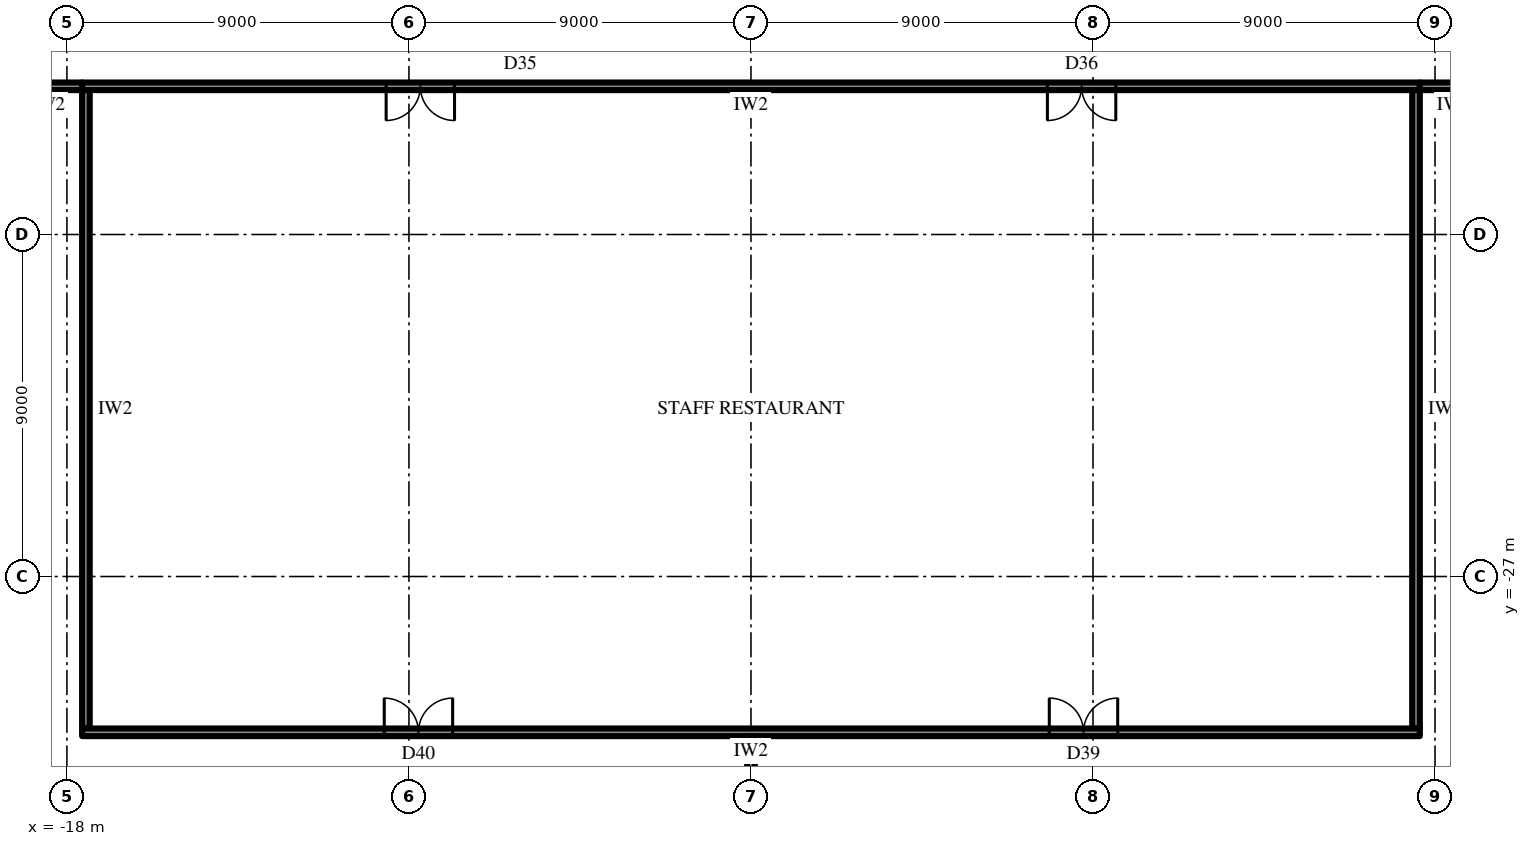
"""IFC4 building model, lengths in metres.
Left out: names, types, materials, properties, quantities, classifications, styles, units other than length and angle.
Written with IfcOpenShell. Run it as: python <this file> out.ifc"""

import sys

from ifc_helpers import new_model, si_unit, direction, frame, frame_2d, origin, place, context, subcontext, project, spatial, rectangle, extrude, element, fill, save


model = new_model("IFC4")
c1 = context("Model", 3, precision=1e-05, world=origin(), true_north=direction((0.0, 1.0)))
c2 = subcontext(c1, "Body", "Model", "MODEL_VIEW")
j1 = project(units=[si_unit("LENGTHUNIT", "METRE"), si_unit("PLANEANGLEUNIT", "RADIAN")], contexts=[c1])
p1 = place(None, origin())
s1 = spatial("IfcSite", under=j1, at=p1, CompositionType="ELEMENT")
p2 = place(p1, origin())
s2 = spatial("IfcBuilding", under=s1, at=p2, CompositionType="ELEMENT")
p3 = place(p2, frame((0.0, 0.0, 7.0)))
s3 = spatial("IfcBuildingStorey", under=s2, at=p3, CompositionType="ELEMENT", Elevation=7.0)
p4 = place(p3, frame((17.6, -14.1, 0.0), z_axis=(0.0, 0.0, 1.0), x_axis=(-1.0, 0.0, 0.0)))
e1 = element("IfcWall", 1, at=p4, inside=s3, PredefinedType="PARTITIONING", context=c2, shape_type="SweptSolid", body=[
    extrude(rectangle(XDim=35.2, YDim=0.2, at=frame_2d((17.6, 0.0))), origin(), (0.0, 0.0, 1.0), 5.65),
])
p5 = place(p4, frame((25.4, 0.0, 0.0)))
e2 = element("IfcOpeningElement", 2, at=p5, cuts=e1, PredefinedType="OPENING", context=c2, shape_type="SweptSolid", body=[
    extrude(rectangle(XDim=1.8, YDim=2.4, at=frame_2d((0.9, 1.2))), frame((0.0, 0.11, 0.0), z_axis=(0.0, -1.0, 0.0), x_axis=(1.0, 0.0, 0.0)), (0.0, 0.0, 1.0), 0.22),
])
p6 = place(p4, frame((8.0, 0.0, 0.0)))
e3 = element("IfcOpeningElement", 3, at=p6, cuts=e1, PredefinedType="OPENING", context=c2, shape_type="SweptSolid", body=[
    extrude(rectangle(XDim=1.8, YDim=2.4, at=frame_2d((0.9, 1.2))), frame((0.0, 0.11, 0.0), z_axis=(0.0, -1.0, 0.0), x_axis=(1.0, 0.0, 0.0)), (0.0, 0.0, 1.0), 0.22),
])
for number, where, z_axis, x_axis in (
    (4, (17.5, -14.2, 0.0), (0.0, 0.0, 1.0), (0.0, -1.0, 0.0)),
    (5, (-17.5, -14.2, 0.0), (0.0, 0.0, 1.0), (0.0, -1.0, 0.0)),
):
    element("IfcWall", number, at=place(p3, frame(where, z_axis=z_axis, x_axis=x_axis)), inside=s3, PredefinedType="PARTITIONING", context=c2, shape_type="SweptSolid", body=[
        extrude(rectangle(XDim=16.8, YDim=0.2, at=frame_2d((8.4, 0.0))), origin(), (0.0, 0.0, 1.0), 5.65),
    ])
p7 = place(p3, frame((17.6, -31.1, 0.0), z_axis=(0.0, 0.0, 1.0), x_axis=(-1.0, 0.0, 0.0)))
e6 = element("IfcWall", 6, at=p7, inside=s3, PredefinedType="PARTITIONING", context=c2, shape_type="SweptSolid", body=[
    extrude(rectangle(XDim=35.2, YDim=0.2, at=frame_2d((17.6, 0.0))), origin(), (0.0, 0.0, 1.0), 5.65),
])
p8 = place(p7, frame((7.95, 0.0, 0.0)))
e7 = element("IfcOpeningElement", 7, at=p8, cuts=e6, PredefinedType="OPENING", context=c2, shape_type="SweptSolid", body=[
    extrude(rectangle(XDim=1.8, YDim=2.4, at=frame_2d((0.9, 1.2))), frame((0.0, 0.11, 0.0), z_axis=(0.0, -1.0, 0.0), x_axis=(1.0, 0.0, 0.0)), (0.0, 0.0, 1.0), 0.22),
])
p9 = place(p7, frame((25.45, 0.0, 0.0)))
e8 = element("IfcOpeningElement", 8, at=p9, cuts=e6, PredefinedType="OPENING", context=c2, shape_type="SweptSolid", body=[
    extrude(rectangle(XDim=1.8, YDim=2.4, at=frame_2d((0.9, 1.2))), frame((0.0, 0.11, 0.0), z_axis=(0.0, -1.0, 0.0), x_axis=(1.0, 0.0, 0.0)), (0.0, 0.0, 1.0), 0.22),
])
for number, where, z_axis, x_axis in (
    (9, (-17.6, -14.1, 0.0), (0.0, 0.0, 1.0), (-1.0, 0.0, 0.0)),
    (10, (19.4, -14.1, 0.0), (0.0, 0.0, 1.0), (-1.0, 0.0, 0.0)),
):
    element("IfcWall", number, at=place(p3, frame(where, z_axis=z_axis, x_axis=x_axis)), inside=s3, PredefinedType="PARTITIONING", context=c2, shape_type="SweptSolid", body=[
        extrude(rectangle(XDim=1.8, YDim=0.2, at=frame_2d((0.9, 0.0))), origin(), (0.0, 0.0, 1.0), 5.65),
    ])
p10 = place(p3, frame((0.0, -31.2, 0.0), z_axis=(0.0, 0.0, 1.0), x_axis=(0.0, -1.0, 0.0)))
e11 = element("IfcWall", 11, at=p10, inside=s3, PredefinedType="PARTITIONING", context=c2, shape_type="SweptSolid", body=[
    extrude(rectangle(XDim=2.52, YDim=0.2, at=frame_2d((1.26, 0.0))), origin(), (0.0, 0.0, 1.0), 4.594),
])
p11 = place(p8, frame((1.8, 0.0, 0.0), z_axis=(0.0, 0.0, 1.0), x_axis=(-1.0, 0.0, 0.0)))
e12 = element("IfcDoor", 12, at=p11, inside=s3, OperationType="DOUBLE_DOOR_SINGLE_SWING", PredefinedType="DOOR", context=c2, shape_type="SweptSolid", body=[
    extrude(rectangle(XDim=1.8, YDim=2.4, at=frame_2d((0.9, 1.2))), frame((0.0, 0.025, 0.0), z_axis=(0.0, -1.0, 0.0), x_axis=(1.0, 0.0, 0.0)), (0.0, 0.0, 1.0), 0.05),
])
fill(e7, e12)
p12 = place(p9, frame((1.8, 0.0, 0.0), z_axis=(0.0, 0.0, 1.0), x_axis=(-1.0, 0.0, 0.0)))
e13 = element("IfcDoor", 13, at=p12, inside=s3, OperationType="DOUBLE_DOOR_SINGLE_SWING", PredefinedType="DOOR", context=c2, shape_type="SweptSolid", body=[
    extrude(rectangle(XDim=1.8, YDim=2.4, at=frame_2d((0.9, 1.2))), frame((0.0, 0.025, 0.0), z_axis=(0.0, -1.0, 0.0), x_axis=(1.0, 0.0, 0.0)), (0.0, 0.0, 1.0), 0.05),
])
fill(e8, e13)
p13 = place(p5, origin())
e14 = element("IfcDoor", 14, at=p13, inside=s3, OperationType="DOUBLE_DOOR_SINGLE_SWING", PredefinedType="DOOR", context=c2, shape_type="SweptSolid", body=[
    extrude(rectangle(XDim=1.8, YDim=2.4, at=frame_2d((0.9, 1.2))), frame((0.0, 0.025, 0.0), z_axis=(0.0, -1.0, 0.0), x_axis=(1.0, 0.0, 0.0)), (0.0, 0.0, 1.0), 0.05),
])
fill(e2, e14)
p14 = place(p6, origin())
e15 = element("IfcDoor", 15, at=p14, inside=s3, OperationType="DOUBLE_DOOR_SINGLE_SWING", PredefinedType="DOOR", context=c2, shape_type="SweptSolid", body=[
    extrude(rectangle(XDim=1.8, YDim=2.4, at=frame_2d((0.9, 1.2))), frame((0.0, 0.025, 0.0), z_axis=(0.0, -1.0, 0.0), x_axis=(1.0, 0.0, 0.0)), (0.0, 0.0, 1.0), 0.05),
])
fill(e3, e15)
save(model, sys.argv[1])
